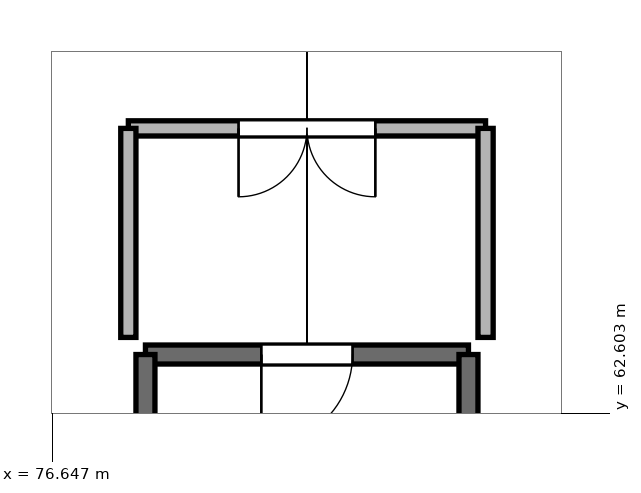
"""IFC4 building model, lengths in metres.
Left out: names, types, materials, properties, quantities, classifications, styles, units other than length and angle.
Written with IfcOpenShell. Run it as: python <this file> out.ifc"""

import sys

from ifc_helpers import new_model, si_unit, direction, frame, frame_2d, origin, place, context, subcontext, project, spatial, rectangle, extrude, element, fill, save


model = new_model("IFC4")
c1 = context("Model", 3, precision=1e-05, world=origin(), true_north=direction((0.0, 1.0)))
c2 = subcontext(c1, "Body", "Model", "MODEL_VIEW")
j1 = project(units=[si_unit("LENGTHUNIT", "METRE"), si_unit("PLANEANGLEUNIT", "RADIAN")], contexts=[c1])
p1 = place(None, origin())
s1 = spatial("IfcSite", under=j1, at=p1, CompositionType="ELEMENT")
p2 = place(p1, origin())
s2 = spatial("IfcBuilding", under=s1, at=p2, CompositionType="ELEMENT")
p3 = place(p2, frame((0.0, 0.0, 24.15)))
s3 = spatial("IfcBuildingStorey", under=s2, at=p3, CompositionType="ELEMENT", Elevation=24.15)
p4 = place(p3, frame((82.125, 63.375, 0.0), z_axis=(0.0, 0.0, 1.0), x_axis=(-1.0, 0.0, 0.0)))
e1 = element("IfcWall", 1, at=p4, inside=s3, PredefinedType="SHEAR", context=c2, shape_type="SweptSolid", body=[
    extrude(rectangle(XDim=4.25, YDim=0.25, at=frame_2d((2.125, 0.0))), origin(), (0.0, 0.0, 1.0), 3.14),
])
p5 = place(p4, frame((1.525, 0.0, 0.0)))
e2 = element("IfcOpeningElement", 2, at=p5, cuts=e1, PredefinedType="OPENING", context=c2, shape_type="SweptSolid", body=[
    extrude(rectangle(XDim=1.2, YDim=2.2, at=frame_2d((0.6, 1.1))), frame((0.0, 0.137, 0.0), z_axis=(0.0, -1.0, 0.0), x_axis=(1.0, 0.0, 0.0)), (0.0, 0.0, 1.0), 0.274),
])
for number, where, z_axis, x_axis in (
    (3, (77.875, 63.375, 0.0), (0.0, 0.0, 1.0), (0.0, -1.0, 0.0)),
    (4, (82.125, 56.175, 0.0), (0.0, 0.0, 1.0), (0.0, 1.0, 0.0)),
):
    element("IfcWall", number, at=place(p3, frame(where, z_axis=z_axis, x_axis=x_axis)), inside=s3, PredefinedType="SHEAR", context=c2, shape_type="SweptSolid", body=[
        extrude(rectangle(XDim=7.2, YDim=0.25, at=frame_2d((3.6, 0.0))), origin(), (0.0, 0.0, 1.0), 3.14),
    ])
p6 = place(p3, frame((77.65, 66.35, 0.0), z_axis=(0.0, 0.0, 1.0), x_axis=(1.0, 0.0, 0.0)))
e5 = element("IfcWall", 5, at=p6, inside=s3, PredefinedType="PARTITIONING", context=c2, shape_type="SweptSolid", body=[
    extrude(rectangle(XDim=4.7, YDim=0.2, at=frame_2d((2.35, 0.0))), origin(), (0.0, 0.0, 1.0), 2.68),
])
p7 = place(p6, frame((1.45, 0.0, 0.0)))
e6 = element("IfcOpeningElement", 6, at=p7, cuts=e5, PredefinedType="OPENING", context=c2, shape_type="SweptSolid", body=[
    extrude(rectangle(XDim=1.8, YDim=2.2, at=frame_2d((0.9, 1.1))), frame((0.0, 0.112, 0.0), z_axis=(0.0, -1.0, 0.0), x_axis=(1.0, 0.0, 0.0)), (0.0, 0.0, 1.0), 0.224),
])
for number, where, z_axis, x_axis in (
    (7, (77.65, 63.6, 0.0), (0.0, 0.0, 1.0), (0.0, 1.0, 0.0)),
    (8, (82.35, 63.6, 0.0), (0.0, 0.0, 1.0), (0.0, 1.0, 0.0)),
):
    element("IfcWall", number, at=place(p3, frame(where, z_axis=z_axis, x_axis=x_axis)), inside=s3, PredefinedType="PARTITIONING", context=c2, shape_type="SweptSolid", body=[
        extrude(rectangle(XDim=2.75, YDim=0.2, at=frame_2d((1.375, 0.0))), origin(), (0.0, 0.0, 1.0), 2.68),
    ])
p8 = place(p5, origin())
e9 = element("IfcDoor", 9, at=p8, inside=s3, OperationType="SINGLE_SWING_RIGHT", PredefinedType="DOOR", context=c2, shape_type="SweptSolid", body=[
    extrude(rectangle(XDim=1.2, YDim=2.2, at=frame_2d((0.6, 1.1))), frame((0.0, 0.025, 0.0), z_axis=(0.0, -1.0, 0.0), x_axis=(1.0, 0.0, 0.0)), (0.0, 0.0, 1.0), 0.05),
])
fill(e2, e9)
p9 = place(p7, frame((1.8, 0.0, 0.0), z_axis=(0.0, 0.0, 1.0), x_axis=(-1.0, 0.0, 0.0)))
e10 = element("IfcDoor", 10, at=p9, inside=s3, OperationType="DOUBLE_DOOR_SINGLE_SWING", PredefinedType="DOOR", context=c2, shape_type="SweptSolid", body=[
    extrude(rectangle(XDim=1.8, YDim=2.2, at=frame_2d((0.9, 1.1))), frame((0.0, 0.025, 0.0), z_axis=(0.0, -1.0, 0.0), x_axis=(1.0, 0.0, 0.0)), (0.0, 0.0, 1.0), 0.05),
])
fill(e6, e10)
save(model, sys.argv[1])
